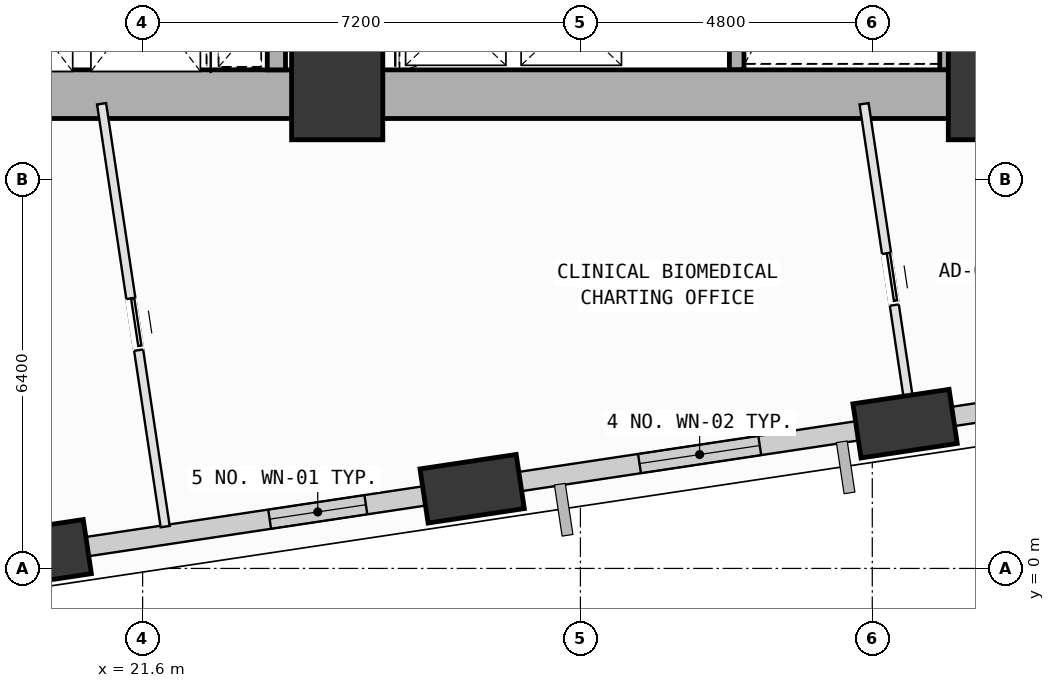
"""IFC4 building model, lengths in metres.
Left out: names, types, materials, properties, quantities, classifications, styles, units other than length and angle.
Written with IfcOpenShell. Run it as: python <this file> out.ifc"""

import sys

from ifc_helpers import new_model, si_unit, direction, frame, frame_2d, origin, origin_2d, place, context, subcontext, project, spatial, rectangle, extrude, element, fill, save


model = new_model("IFC4")
c1 = context("Model", 3, precision=1e-05, world=origin(), true_north=direction((0.0, 1.0)))
c2 = subcontext(c1, "Body", "Model", "MODEL_VIEW")
j1 = project(units=[si_unit("LENGTHUNIT", "METRE"), si_unit("PLANEANGLEUNIT", "RADIAN")], contexts=[c1])
p1 = place(None, origin())
s1 = spatial("IfcSite", under=j1, at=p1, CompositionType="ELEMENT")
p2 = place(p1, origin())
s2 = spatial("IfcBuilding", under=s1, at=p2, CompositionType="ELEMENT")
p3 = place(p2, frame((0.0, 0.0, 59.0)))
s3 = spatial("IfcBuildingStorey", under=s2, at=p3, CompositionType="ELEMENT", Elevation=59.0)
for number, where, z_axis, x_axis in (
    (1, (24.8, 7.8, 0.0), (0.0, 0.0, 1.0), (1.0, 0.0, 0.0)),
    (2, (35.6, 7.8, 0.0), (0.0, 0.0, 1.0), (1.0, 0.0, 0.0)),
):
    element("IfcColumn", number, at=place(p3, frame(where, z_axis=z_axis, x_axis=x_axis)), inside=s3, PredefinedType="COLUMN", context=c2, shape_type="SweptSolid", body=[
        extrude(rectangle(XDim=1.5, YDim=1.5, at=origin_2d()), origin(), (0.0, 0.0, 1.0), 4.0),
    ])
p4 = place(p3, frame((19.899, 0.24, 0.002), z_axis=(0.101572465572, -0.055579676502, 0.993274349713), x_axis=(0.345145565671, 0.938391292379, 0.017213973542)))
e3 = element("IfcColumn", 3, at=p4, inside=s3, PredefinedType="COLUMN", context=c2, shape_type="SweptSolid", body=[
    extrude(rectangle(XDim=1.6, YDim=0.9, at=origin_2d()), origin(), (0.0, 0.0, 1.0), 4.024),
])
p5 = place(p3, frame((27.019, 1.311, 0.002), z_axis=(0.097061928974, -0.026316728394, 0.994930355226), x_axis=(0.116012789516, 0.99313518065, 0.014951442173)))
e4 = element("IfcColumn", 4, at=p5, inside=s3, PredefinedType="COLUMN", context=c2, shape_type="SweptSolid", body=[
    extrude(rectangle(XDim=1.6, YDim=0.9, at=origin_2d()), origin(), (0.0, 0.0, 1.0), 4.017),
])
p6 = place(p3, frame((34.139, 2.381, 0.002), z_axis=(0.092514972069, 0.002980429738, 0.995706832849), x_axis=(-0.179798499691, 0.983607197477, 0.01376156172)))
e5 = element("IfcColumn", 5, at=p6, inside=s3, PredefinedType="COLUMN", context=c2, shape_type="SweptSolid", body=[
    extrude(rectangle(XDim=1.6, YDim=0.9, at=origin_2d()), origin(), (0.0, 0.0, 1.0), 4.014),
])
p7 = place(p3, frame((26.606, 1.249, 0.0), z_axis=(0.0, 0.0, 1.0), x_axis=(-0.988887995739, -0.14866247638, 0.0)))
e6 = element("IfcWall", 6, at=p7, inside=s3, PredefinedType="SOLIDWALL", context=c2, shape_type="SweptSolid", body=[
    extrude(rectangle(XDim=6.006, YDim=0.32, at=frame_2d((3.003, 0.0))), origin(), (0.0, 0.0, 1.0), 3.165),
])
p8 = place(p7, frame((1.35, 0.0, 0.75)))
e7 = element("IfcOpeningElement", 7, at=p8, cuts=e6, PredefinedType="OPENING", context=c2, shape_type="SweptSolid", body=[
    extrude(rectangle(XDim=1.6, YDim=1.95, at=frame_2d((0.8, 0.975))), frame((0.0, 0.17, 0.0), z_axis=(0.0, -1.0, 0.0), x_axis=(1.0, 0.0, 0.0)), (0.0, 0.0, 1.0), 0.34),
])
p9 = place(p3, frame((33.721, 2.318, 0.0), z_axis=(0.0, 0.0, 1.0), x_axis=(-0.988883371434, -0.148693233543, 0.0)))
e8 = element("IfcWall", 8, at=p9, inside=s3, PredefinedType="SOLIDWALL", context=c2, shape_type="SweptSolid", body=[
    extrude(rectangle(XDim=5.99, YDim=0.32, at=frame_2d((2.995, 0.0))), origin(), (0.0, 0.0, 1.0), 3.165),
])
p10 = place(p9, frame((1.994, 0.0, 0.75)))
e9 = element("IfcOpeningElement", 9, at=p10, cuts=e8, PredefinedType="OPENING", context=c2, shape_type="SweptSolid", body=[
    extrude(rectangle(XDim=2.0, YDim=1.95, at=frame_2d((1.0, 0.975))), frame((0.0, 0.17, 0.0), z_axis=(0.0, -1.0, 0.0), x_axis=(1.0, 0.0, 0.0)), (0.0, 0.0, 1.0), 0.34),
])
p11 = place(p3, frame((40.841, 3.389, 0.0), z_axis=(0.0, 0.0, 1.0), x_axis=(-0.988886033007, -0.148675531691, 0.0)))
e10 = element("IfcWall", 10, at=p11, inside=s3, PredefinedType="SOLIDWALL", context=c2, shape_type="SweptSolid", body=[
    extrude(rectangle(XDim=5.985, YDim=0.32, at=frame_2d((2.993, 0.0))), origin(), (0.0, 0.0, 1.0), 3.165),
])
p12 = place(p11, frame((2.293, 0.0, 0.75)))
e11 = element("IfcOpeningElement", 11, at=p12, cuts=e10, PredefinedType="OPENING", context=c2, shape_type="SweptSolid", body=[
    extrude(rectangle(XDim=1.4, YDim=1.85, at=frame_2d((0.7, 0.925))), frame((0.0, 0.17, 0.0), z_axis=(0.0, -1.0, 0.0), x_axis=(1.0, 0.0, 0.0)), (0.0, 0.0, 1.0), 0.34),
])
for number, where, z_axis, x_axis in (
    (12, (34.83, 15.12, 0.0), (0.0, 0.0, 1.0), (0.0, -1.0, 0.0)),
    (13, (31.37, 8.2, 0.0), (0.0, 0.0, 1.0), (0.0, 1.0, 0.0)),
):
    element("IfcWall", number, at=place(p3, frame(where, z_axis=z_axis, x_axis=x_axis)), inside=s3, PredefinedType="SOLIDWALL", context=c2, shape_type="SweptSolid", body=[
        extrude(rectangle(XDim=6.92, YDim=0.24, at=frame_2d((3.46, 0.0))), origin(), (0.0, 0.0, 1.0), 3.78),
    ])
for number, where, z_axis, x_axis in (
    (14, (14.0, 7.8, 0.0), (0.0, 0.0, 1.0), (1.0, 0.0, 0.0)),
    (15, (24.8, 7.8, 0.0), (0.0, 0.0, 1.0), (1.0, 0.0, 0.0)),
):
    element("IfcWall", number, at=place(p3, frame(where, z_axis=z_axis, x_axis=x_axis)), inside=s3, PredefinedType="SHEAR", context=c2, shape_type="SweptSolid", body=[
        extrude(rectangle(XDim=10.8, YDim=0.8, at=frame_2d((5.4, 0.0))), origin(), (0.0, 0.0, 1.0), 3.78),
    ])
p13 = place(p3, frame((35.6, 7.8, 0.0), z_axis=(0.0, 0.0, 1.0), x_axis=(0.0, 1.0, 0.0)))
e16 = element("IfcWall", 16, at=p13, inside=s3, PredefinedType="SHEAR", context=c2, shape_type="SweptSolid", body=[
    extrude(rectangle(XDim=9.0, YDim=0.8, at=frame_2d((4.5, 0.0))), origin(), (0.0, 0.0, 1.0), 3.78),
])
p14 = place(p3, frame((23.8, 8.2, 0.0), z_axis=(0.0, 0.0, 1.0), x_axis=(0.0, 1.0, 0.0)))
e17 = element("IfcWall", 17, at=p14, inside=s3, PredefinedType="SOLIDWALL", context=c2, shape_type="SweptSolid", body=[
    extrude(rectangle(XDim=2.48, YDim=0.3, at=frame_2d((1.24, 0.0))), origin(), (0.0, 0.0, 1.0), 3.78),
])
p15 = place(p3, frame((20.925, 7.642, 0.0), z_axis=(0.0, 0.0, 1.0), x_axis=(0.148727506092, -0.988878217442, 0.0)))
e18 = element("IfcWall", 18, at=p15, inside=s3, PredefinedType="PARTITIONING", context=c2, shape_type="SweptSolid", body=[
    extrude(rectangle(XDim=7.032, YDim=0.15, at=frame_2d((3.516, 0.0))), origin(), (0.0, 0.0, 1.0), 3.78),
])
p16 = place(p15, frame((3.238, 0.0, 0.0)))
e19 = element("IfcOpeningElement", 19, at=p16, cuts=e18, PredefinedType="OPENING", context=c2, shape_type="SweptSolid", body=[
    extrude(rectangle(XDim=0.86, YDim=2.06, at=frame_2d((0.43, 1.03))), frame((0.0, 0.085, 0.0), z_axis=(0.0, -1.0, 0.0), x_axis=(1.0, 0.0, 0.0)), (0.0, 0.0, 1.0), 0.17),
])
p17 = place(p3, frame((20.702, 0.128, 0.0), z_axis=(0.0, 0.0, 1.0), x_axis=(-0.988869653408, -0.148784436583, 0.0)))
e20 = element("IfcWall", 20, at=p17, inside=s3, PredefinedType="PARTITIONING", context=c2, shape_type="SweptSolid", body=[
    extrude(rectangle(XDim=1.183, YDim=0.15, at=frame_2d((0.592, 0.0))), origin(), (0.0, 0.0, 1.0), 3.165),
])
p18 = place(p3, frame((34.287, 2.171, 0.0), z_axis=(0.0, 0.0, 1.0), x_axis=(-0.988936352868, -0.14834045293, 0.0)))
e21 = element("IfcWall", 21, at=p18, inside=s3, PredefinedType="PARTITIONING", context=c2, shape_type="SweptSolid", body=[
    extrude(rectangle(XDim=0.538, YDim=0.15, at=frame_2d((0.269, 0.0))), origin(), (0.0, 0.0, 1.0), 3.165),
])
p19 = place(p3, frame((27.832, 1.2, 0.0), z_axis=(0.0, 0.0, 1.0), x_axis=(-0.988897657589, -0.1485981925, 0.0)))
e22 = element("IfcWall", 22, at=p19, inside=s3, PredefinedType="PARTITIONING", context=c2, shape_type="SweptSolid", body=[
    extrude(rectangle(XDim=1.204, YDim=0.15, at=frame_2d((0.602, 0.0))), origin(), (0.0, 0.0, 1.0), 3.165),
])
p20 = place(p3, frame((33.465, 7.642, 0.0), z_axis=(0.0, 0.0, 1.0), x_axis=(0.14857781012, -0.988900720164, 0.0)))
e23 = element("IfcWall", 23, at=p20, inside=s3, PredefinedType="PARTITIONING", context=c2, shape_type="SweptSolid", body=[
    extrude(rectangle(XDim=5.533, YDim=0.15, at=frame_2d((2.766, 0.0))), origin(), (0.0, 0.0, 1.0), 3.78),
])
p21 = place(p20, frame((2.488, 0.0, 0.0)))
e24 = element("IfcOpeningElement", 24, at=p21, cuts=e23, PredefinedType="OPENING", context=c2, shape_type="SweptSolid", body=[
    extrude(rectangle(XDim=0.86, YDim=2.06, at=frame_2d((0.43, 1.03))), frame((0.0, 0.085, 0.0), z_axis=(0.0, -1.0, 0.0), x_axis=(1.0, 0.0, 0.0)), (0.0, 0.0, 1.0), 0.17),
])
p22 = place(p3, frame((34.957, 2.271, 0.0), z_axis=(0.0, 0.0, 1.0), x_axis=(-0.988905199831, -0.148547991391, 0.0)))
e25 = element("IfcWall", 25, at=p22, inside=s3, PredefinedType="PARTITIONING", context=c2, shape_type="SweptSolid", body=[
    extrude(rectangle(XDim=0.518, YDim=0.15, at=frame_2d((0.259, 0.0))), origin(), (0.0, 0.0, 1.0), 3.165),
])
p23 = place(p8, origin())
e26 = element("IfcWindow", 26, at=p23, inside=s3, PartitioningType="SINGLE_PANEL", PredefinedType="WINDOW", context=c2, shape_type="SweptSolid", body=[
    extrude(rectangle(XDim=1.6, YDim=1.95, at=frame_2d((0.8, 0.975))), frame((0.0, 0.03, 0.0), z_axis=(0.0, -1.0, 0.0), x_axis=(1.0, 0.0, 0.0)), (0.0, 0.0, 1.0), 0.06),
])
fill(e7, e26)
p24 = place(p10, origin())
e27 = element("IfcWindow", 27, at=p24, inside=s3, PartitioningType="SINGLE_PANEL", PredefinedType="WINDOW", context=c2, shape_type="SweptSolid", body=[
    extrude(rectangle(XDim=2.0, YDim=1.95, at=frame_2d((1.0, 0.975))), frame((0.0, 0.03, 0.0), z_axis=(0.0, -1.0, 0.0), x_axis=(1.0, 0.0, 0.0)), (0.0, 0.0, 1.0), 0.06),
])
fill(e9, e27)
p25 = place(p21, origin())
e28 = element("IfcDoor", 28, at=p25, inside=s3, OperationType="SLIDING_TO_LEFT", PredefinedType="DOOR", context=c2, shape_type="SweptSolid", body=[
    extrude(rectangle(XDim=0.86, YDim=2.06, at=frame_2d((0.43, 1.03))), frame((0.0, 0.025, 0.0), z_axis=(0.0, -1.0, 0.0), x_axis=(1.0, 0.0, 0.0)), (0.0, 0.0, 1.0), 0.05),
])
fill(e24, e28)
p26 = place(p16, origin())
e29 = element("IfcDoor", 29, at=p26, inside=s3, OperationType="SLIDING_TO_LEFT", PredefinedType="DOOR", context=c2, shape_type="SweptSolid", body=[
    extrude(rectangle(XDim=0.86, YDim=2.06, at=frame_2d((0.43, 1.03))), frame((0.0, 0.025, 0.0), z_axis=(0.0, -1.0, 0.0), x_axis=(1.0, 0.0, 0.0)), (0.0, 0.0, 1.0), 0.05),
])
fill(e19, e29)
save(model, sys.argv[1])
